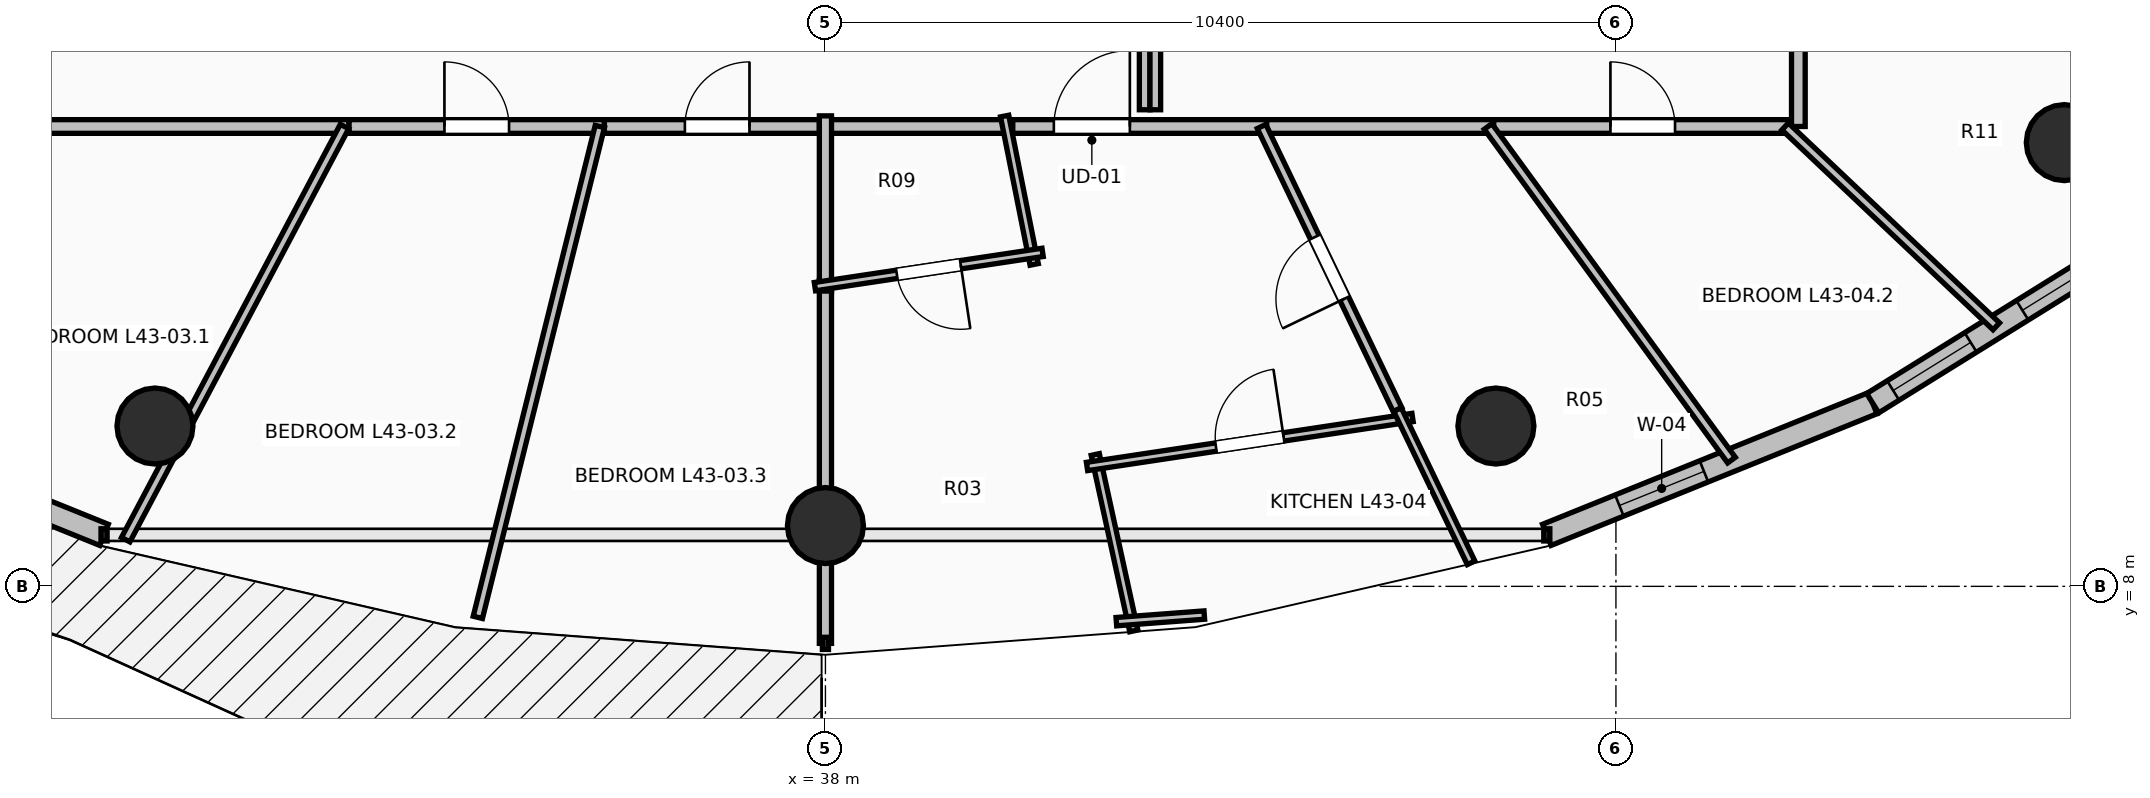
"""IFC4 building model, lengths in metres.
Left out: names, types, materials, properties, quantities, classifications, styles, units other than length and angle.
Written with IfcOpenShell. Run it as: python <this file> out.ifc"""

import sys

from ifc_helpers import new_model, si_unit, direction, frame, frame_2d, origin, origin_2d, place, context, subcontext, project, spatial, rectangle, circle, extrude, element, fill, save


model = new_model("IFC4")
c1 = context("Model", 3, precision=1e-05, world=origin(), true_north=direction((0.0, 1.0)))
c2 = subcontext(c1, "Body", "Model", "MODEL_VIEW")
j1 = project(units=[si_unit("LENGTHUNIT", "METRE"), si_unit("PLANEANGLEUNIT", "RADIAN")], contexts=[c1])
p1 = place(None, origin())
s1 = spatial("IfcSite", under=j1, at=p1, CompositionType="ELEMENT")
p2 = place(p1, origin())
s2 = spatial("IfcBuilding", under=s1, at=p2, CompositionType="ELEMENT")
p3 = place(p2, frame((0.0, 0.0, 160.6)))
s3 = spatial("IfcBuildingStorey", under=s2, at=p3, CompositionType="ELEMENT", Elevation=160.6)
for number, where, z_axis, x_axis in (
    (1, (29.179, 10.109, 0.0), (0.0, 0.0, 1.0), (-0.383, -0.924, 0.0)),
    (2, (38.0, 8.8, 0.0), (0.0, 0.0, 1.0), (0.0, -1.0, 0.0)),
    (3, (46.821, 10.109, 0.0), (0.0, 0.0, 1.0), (0.383, -0.924, 0.0)),
    (4, (54.299, 13.838, 0.0), (0.0, 0.0, 1.0), (0.707, -0.707, 0.0)),
):
    element("IfcColumn", number, at=place(p3, frame(where, z_axis=z_axis, x_axis=x_axis)), inside=s3, PredefinedType="COLUMN", context=c2, shape_type="SweptSolid", body=[
        extrude(circle(Radius=0.5, at=origin_2d()), origin(), (0.0, 0.0, 1.0), 3.5),
    ])
p4 = place(p3, frame((24.222, 10.41, 0.0), z_axis=(0.0, 0.0, 1.0), x_axis=(0.927156504392, -0.374674280359, 0.0)))
e5 = element("IfcWall", 5, at=p4, inside=s3, PredefinedType="STANDARD", context=c2, shape_type="SweptSolid", body=[
    extrude(rectangle(XDim=4.625, YDim=0.3, at=frame_2d((2.312, 0.0))), origin(), (0.0, 0.0, 1.0), 3.24),
])
p5 = place(p4, frame((1.512, 0.0, 0.0)))
e6 = element("IfcOpeningElement", 6, at=p5, cuts=e5, PredefinedType="OPENING", context=c2, shape_type="SweptSolid", body=[
    extrude(rectangle(XDim=1.6, YDim=2.3, at=frame_2d((0.8, 1.15))), frame((0.0, 0.165, 0.0), z_axis=(0.0, -1.0, 0.0), x_axis=(1.0, 0.0, 0.0)), (0.0, 0.0, 1.0), 0.33),
])
p6 = place(p3, frame((47.49, 8.677, 0.0), z_axis=(0.0, 0.0, 1.0), x_axis=(0.927156504392, 0.374674280359, 0.0)))
e7 = element("IfcWall", 7, at=p6, inside=s3, PredefinedType="STANDARD", context=c2, shape_type="SweptSolid", body=[
    extrude(rectangle(XDim=4.625, YDim=0.3, at=frame_2d((2.312, 0.0))), origin(), (0.0, 0.0, 1.0), 3.24),
])
p7 = place(p6, frame((1.03, 0.0, 0.85)))
e8 = element("IfcOpeningElement", 8, at=p7, cuts=e7, PredefinedType="OPENING", context=c2, shape_type="SweptSolid", body=[
    extrude(rectangle(XDim=1.2, YDim=1.95, at=frame_2d((0.6, 0.975))), frame((0.0, 0.165, 0.0), z_axis=(0.0, -1.0, 0.0), x_axis=(1.0, 0.0, 0.0)), (0.0, 0.0, 1.0), 0.33),
])
p8 = place(p3, frame((51.778, 10.41, 0.0), z_axis=(0.0, 0.0, 1.0), x_axis=(0.849721181976, 0.527232313977, 0.0)))
e9 = element("IfcWall", 9, at=p8, inside=s3, PredefinedType="STANDARD", context=c2, shape_type="SweptSolid", body=[
    extrude(rectangle(XDim=4.423, YDim=0.3, at=frame_2d((2.211, 0.0))), origin(), (0.0, 0.0, 1.0), 3.24),
])
p9 = place(p8, frame((0.317, 0.0, 0.85)))
e10 = element("IfcOpeningElement", 10, at=p9, cuts=e9, PredefinedType="OPENING", context=c2, shape_type="SweptSolid", body=[
    extrude(rectangle(XDim=1.2, YDim=1.95, at=frame_2d((0.6, 0.975))), frame((0.0, 0.165, 0.0), z_axis=(0.0, -1.0, 0.0), x_axis=(1.0, 0.0, 0.0)), (0.0, 0.0, 1.0), 0.33),
])
p10 = place(p8, frame((2.318, 0.0, 0.85)))
e11 = element("IfcOpeningElement", 11, at=p10, cuts=e9, PredefinedType="OPENING", context=c2, shape_type="SweptSolid", body=[
    extrude(rectangle(XDim=1.2, YDim=1.95, at=frame_2d((0.6, 0.975))), frame((0.0, 0.165, 0.0), z_axis=(0.0, -1.0, 0.0), x_axis=(1.0, 0.0, 0.0)), (0.0, 0.0, 1.0), 0.33),
])
p11 = place(p3, frame((27.357, 14.05, 0.0), z_axis=(0.0, 0.0, 1.0), x_axis=(1.0, 0.0, 0.0)))
e12 = element("IfcWall", 12, at=p11, inside=s3, PredefinedType="PARTITIONING", context=c2, shape_type="SweptSolid", body=[
    extrude(rectangle(XDim=4.376, YDim=0.18, at=frame_2d((2.188, 0.0))), origin(), (0.0, 0.0, 1.0), 2.432),
])
p12 = place(p3, frame((31.733, 14.05, 0.0), z_axis=(0.0, 0.0, 1.0), x_axis=(1.0, 0.0, 0.0)))
e13 = element("IfcWall", 13, at=p12, inside=s3, PredefinedType="PARTITIONING", context=c2, shape_type="SweptSolid", body=[
    extrude(rectangle(XDim=3.359, YDim=0.18, at=frame_2d((1.68, 0.0))), origin(), (0.0, 0.0, 1.0), 2.929),
])
p13 = place(p12, frame((1.254, 0.0, 0.0)))
e14 = element("IfcOpeningElement", 14, at=p13, cuts=e13, PredefinedType="OPENING", context=c2, shape_type="SweptSolid", body=[
    extrude(rectangle(XDim=0.85, YDim=2.1, at=frame_2d((0.425, 1.05))), frame((0.0, 0.105, 0.0), z_axis=(0.0, -1.0, 0.0), x_axis=(1.0, 0.0, 0.0)), (0.0, 0.0, 1.0), 0.21),
])
p14 = place(p3, frame((35.092, 14.05, 0.0), z_axis=(0.0, 0.0, 1.0), x_axis=(1.0, 0.0, 0.0)))
e15 = element("IfcWall", 15, at=p14, inside=s3, PredefinedType="PARTITIONING", context=c2, shape_type="SweptSolid", body=[
    extrude(rectangle(XDim=2.968, YDim=0.18, at=frame_2d((1.484, 0.0))), origin(), (0.0, 0.0, 1.0), 2.929),
])
p15 = place(p14, frame((1.059, 0.0, 0.0)))
e16 = element("IfcOpeningElement", 16, at=p15, cuts=e15, PredefinedType="OPENING", context=c2, shape_type="SweptSolid", body=[
    extrude(rectangle(XDim=0.85, YDim=2.1, at=frame_2d((0.425, 1.05))), frame((0.0, 0.105, 0.0), z_axis=(0.0, -1.0, 0.0), x_axis=(1.0, 0.0, 0.0)), (0.0, 0.0, 1.0), 0.21),
])
p16 = place(p3, frame((40.325, 14.05, 0.0), z_axis=(0.0, 0.0, 1.0), x_axis=(1.0, 0.0, 0.0)))
e17 = element("IfcWall", 17, at=p16, inside=s3, PredefinedType="PARTITIONING", context=c2, shape_type="SweptSolid", body=[
    extrude(rectangle(XDim=3.48, YDim=0.18, at=frame_2d((1.74, 0.0))), origin(), (0.0, 0.0, 1.0), 3.24),
])
p17 = place(p16, frame((0.68, 0.0, 0.0)))
e18 = element("IfcOpeningElement", 18, at=p17, cuts=e17, PredefinedType="OPENING", context=c2, shape_type="SweptSolid", body=[
    extrude(rectangle(XDim=1.0, YDim=2.15, at=frame_2d((0.5, 1.075))), frame((0.0, 0.105, 0.0), z_axis=(0.0, -1.0, 0.0), x_axis=(1.0, 0.0, 0.0)), (0.0, 0.0, 1.0), 0.21),
])
p18 = place(p3, frame((37.92, 14.05, 0.0), z_axis=(0.0, 0.0, 1.0), x_axis=(1.0, 0.0, 0.0)))
e19 = element("IfcWall", 19, at=p18, inside=s3, PredefinedType="PARTITIONING", context=c2, shape_type="SweptSolid", body=[
    extrude(rectangle(XDim=2.545, YDim=0.18, at=frame_2d((1.272, 0.0))), origin(), (0.0, 0.0, 1.0), 2.929),
])
p19 = place(p3, frame((43.805, 14.05, 0.0), z_axis=(0.0, 0.0, 1.0), x_axis=(1.0, 0.0, 0.0)))
e20 = element("IfcWall", 20, at=p19, inside=s3, PredefinedType="PARTITIONING", context=c2, shape_type="SweptSolid", body=[
    extrude(rectangle(XDim=2.987, YDim=0.18, at=frame_2d((1.494, 0.0))), origin(), (0.0, 0.0, 1.0), 2.432),
])
p20 = place(p3, frame((46.792, 14.05, 0.0), z_axis=(0.0, 0.0, 1.0), x_axis=(1.0, 0.0, 0.0)))
e21 = element("IfcWall", 21, at=p20, inside=s3, PredefinedType="PARTITIONING", context=c2, shape_type="SweptSolid", body=[
    extrude(rectangle(XDim=3.921, YDim=0.18, at=frame_2d((1.96, 0.0))), origin(), (0.0, 0.0, 1.0), 2.432),
])
p21 = place(p20, frame((1.535, 0.0, 0.0)))
e22 = element("IfcOpeningElement", 22, at=p21, cuts=e21, PredefinedType="OPENING", context=c2, shape_type="SweptSolid", body=[
    extrude(rectangle(XDim=0.85, YDim=2.1, at=frame_2d((0.425, 1.05))), frame((0.0, 0.105, 0.0), z_axis=(0.0, -1.0, 0.0), x_axis=(1.0, 0.0, 0.0)), (0.0, 0.0, 1.0), 0.21),
])
p22 = place(p3, frame((50.8, 14.05, 0.0), z_axis=(0.0, 0.0, 1.0), x_axis=(0.0, 1.0, 0.0)))
e23 = element("IfcWall", 23, at=p22, inside=s3, PredefinedType="PARTITIONING", context=c2, shape_type="SweptSolid", body=[
    extrude(rectangle(XDim=3.709, YDim=0.18, at=frame_2d((1.854, 0.0))), origin(), (0.0, 0.0, 1.0), 2.432),
])
p23 = place(p22, frame((1.429, 0.0, 0.0)))
e24 = element("IfcOpeningElement", 24, at=p23, cuts=e23, PredefinedType="OPENING", context=c2, shape_type="SweptSolid", body=[
    extrude(rectangle(XDim=0.85, YDim=2.1, at=frame_2d((0.425, 1.05))), frame((0.0, 0.105, 0.0), z_axis=(0.0, -1.0, 0.0), x_axis=(1.0, 0.0, 0.0)), (0.0, 0.0, 1.0), 0.21),
])
p24 = place(p3, frame((28.794, 8.614, 0.0), z_axis=(0.0, 0.0, 1.0), x_axis=(0.468046359573, 0.883703912682, 0.0)))
e25 = element("IfcWall", 25, at=p24, inside=s3, PredefinedType="PARTITIONING", context=c2, shape_type="SweptSolid", body=[
    extrude(rectangle(XDim=6.151, YDim=0.125, at=frame_2d((3.076, 0.0))), origin(), (0.0, 0.0, 1.0), 2.728),
])
p25 = place(p3, frame((33.427, 7.592, 0.0), z_axis=(0.0, 0.0, 1.0), x_axis=(0.241188715884, 0.970478234341, 0.0)))
e26 = element("IfcWall", 26, at=p25, inside=s3, PredefinedType="PARTITIONING", context=c2, shape_type="SweptSolid", body=[
    extrude(rectangle(XDim=6.655, YDim=0.125, at=frame_2d((3.327, 0.0))), origin(), (0.0, 0.0, 1.0), 2.728),
])
p26 = place(p3, frame((38.0, 7.25, 0.0), z_axis=(0.0, 0.0, 1.0), x_axis=(0.0, 1.0, 0.0)))
e27 = element("IfcWall", 27, at=p26, inside=s3, PredefinedType="PARTITIONING", context=c2, shape_type="SweptSolid", body=[
    extrude(rectangle(XDim=4.775, YDim=0.16, at=frame_2d((2.387, 0.0))), origin(), (0.0, 0.0, 1.0), 2.886),
])
p27 = place(p3, frame((38.0, 11.885, 0.0), z_axis=(0.0, 0.0, 1.0), x_axis=(0.0, 1.0, 0.0)))
e28 = element("IfcWall", 28, at=p27, inside=s3, PredefinedType="PARTITIONING", context=c2, shape_type="SweptSolid", body=[
    extrude(rectangle(XDim=2.305, YDim=0.16, at=frame_2d((1.152, 0.0))), origin(), (0.0, 0.0, 1.0), 2.929),
])
p28 = place(p3, frame((40.358, 14.187, 0.0), z_axis=(0.0, 0.0, 1.0), x_axis=(0.195313900905, -0.980740781304, 0.0)))
e29 = element("IfcWall", 29, at=p28, inside=s3, PredefinedType="PARTITIONING", context=c2, shape_type="SweptSolid", body=[
    extrude(rectangle(XDim=1.99, YDim=0.11, at=frame_2d((0.995, 0.0))), origin(), (0.0, 0.0, 1.0), 2.929),
])
p29 = place(p3, frame((40.857, 12.394, 0.0), z_axis=(0.0, 0.0, 1.0), x_axis=(-0.988873015636, -0.148762088409, 0.0)))
e30 = element("IfcWall", 30, at=p29, inside=s3, PredefinedType="PARTITIONING", context=c2, shape_type="SweptSolid", body=[
    extrude(rectangle(XDim=3.03, YDim=0.11, at=frame_2d((1.515, 0.0))), origin(), (0.0, 0.0, 1.0), 3.24),
])
p30 = place(p29, frame((1.09, 0.0, 0.0)))
e31 = element("IfcOpeningElement", 31, at=p30, cuts=e30, PredefinedType="OPENING", context=c2, shape_type="SweptSolid", body=[
    extrude(rectangle(XDim=0.85, YDim=2.1, at=frame_2d((0.425, 1.05))), frame((0.0, 0.07, 0.0), z_axis=(0.0, -1.0, 0.0), x_axis=(1.0, 0.0, 0.0)), (0.0, 0.0, 1.0), 0.14),
])
p31 = place(p3, frame((42.057, 7.414, 0.0), z_axis=(0.0, 0.0, 1.0), x_axis=(-0.213381137421, 0.976969032361, 0.0)))
e32 = element("IfcWall", 32, at=p31, inside=s3, PredefinedType="PARTITIONING", context=c2, shape_type="SweptSolid", body=[
    extrude(rectangle(XDim=2.375, YDim=0.11, at=frame_2d((1.188, 0.0))), origin(), (0.0, 0.0, 1.0), 2.728),
])
p32 = place(p3, frame((41.442, 9.577, 0.0), z_axis=(0.0, 0.0, 1.0), x_axis=(0.988864290865, 0.148820073417, 0.0)))
e33 = element("IfcWall", 33, at=p32, inside=s3, PredefinedType="PARTITIONING", context=c2, shape_type="SweptSolid", body=[
    extrude(rectangle(XDim=4.331, YDim=0.11, at=frame_2d((2.166, 0.0))), origin(), (0.0, 0.0, 1.0), 3.24),
])
p33 = place(p32, frame((1.716, 0.0, 0.0)))
e34 = element("IfcOpeningElement", 34, at=p33, cuts=e33, PredefinedType="OPENING", context=c2, shape_type="SweptSolid", body=[
    extrude(rectangle(XDim=0.9, YDim=2.1, at=frame_2d((0.45, 1.05))), frame((0.0, 0.07, 0.0), z_axis=(0.0, -1.0, 0.0), x_axis=(1.0, 0.0, 0.0)), (0.0, 0.0, 1.0), 0.14),
])
p34 = place(p3, frame((45.525, 10.327, 0.0), z_axis=(0.0, 0.0, 1.0), x_axis=(0.433064390328, -0.901362986721, 0.0)))
e35 = element("IfcWall", 35, at=p34, inside=s3, PredefinedType="PARTITIONING", context=c2, shape_type="SweptSolid", body=[
    extrude(rectangle(XDim=2.238, YDim=0.11, at=frame_2d((1.119, 0.0))), origin(), (0.0, 0.0, 1.0), 2.728),
])
p35 = place(p3, frame((41.827, 7.535, 0.0), z_axis=(0.0, 0.0, 1.0), x_axis=(0.997175725754, 0.07510374137, 0.0)))
e36 = element("IfcWall", 36, at=p35, inside=s3, PredefinedType="PARTITIONING", context=c2, shape_type="SweptSolid", body=[
    extrude(rectangle(XDim=1.16, YDim=0.11, at=frame_2d((0.58, 0.0))), origin(), (0.0, 0.0, 1.0), 3.24),
])
p36 = place(p3, frame((45.526, 10.327, 0.0), z_axis=(0.0, 0.0, 1.0), x_axis=(-0.432873287366, 0.90145477817, 0.0)))
e37 = element("IfcWall", 37, at=p36, inside=s3, PredefinedType="PARTITIONING", context=c2, shape_type="SweptSolid", body=[
    extrude(rectangle(XDim=4.13, YDim=0.125, at=frame_2d((2.065, 0.0))), origin(), (0.0, 0.0, 1.0), 2.432),
])
p37 = place(p36, frame((1.615, 0.0, 0.0)))
e38 = element("IfcOpeningElement", 38, at=p37, cuts=e37, PredefinedType="OPENING", context=c2, shape_type="SweptSolid", body=[
    extrude(rectangle(XDim=0.9, YDim=2.1, at=frame_2d((0.45, 1.05))), frame((0.0, 0.077, 0.0), z_axis=(0.0, -1.0, 0.0), x_axis=(1.0, 0.0, 0.0)), (0.0, 0.0, 1.0), 0.155),
])
p38 = place(p3, frame((49.92, 9.661, 0.0), z_axis=(0.0, 0.0, 1.0), x_axis=(-0.589349395673, 0.807878264233, 0.0)))
e39 = element("IfcWall", 39, at=p38, inside=s3, PredefinedType="PARTITIONING", context=c2, shape_type="SweptSolid", body=[
    extrude(rectangle(XDim=5.433, YDim=0.125, at=frame_2d((2.716, 0.0))), origin(), (0.0, 0.0, 1.0), 2.432),
])
p39 = place(p3, frame((53.404, 11.421, 0.0), z_axis=(0.0, 0.0, 1.0), x_axis=(-0.726306487509, 0.687370996044, 0.0)))
e40 = element("IfcWall", 40, at=p39, inside=s3, PredefinedType="PARTITIONING", context=c2, shape_type="SweptSolid", body=[
    extrude(rectangle(XDim=3.825, YDim=0.125, at=frame_2d((1.913, 0.0))), origin(), (0.0, 0.0, 1.0), 2.728),
])
p40 = place(p3, frame((56.736, 13.85, 0.0), z_axis=(0.0, 0.0, 1.0), x_axis=(-0.839059638195, 0.544039450364, 0.0)))
e41 = element("IfcWall", 41, at=p40, inside=s3, PredefinedType="PARTITIONING", context=c2, shape_type="SweptSolid", body=[
    extrude(rectangle(XDim=7.075, YDim=0.125, at=frame_2d((3.537, 0.0))), origin(), (0.0, 0.0, 1.0), 2.728),
])
for number, where, z_axis, x_axis in (
    (42, (42.2, 16.1, 0.0), (0.0, 0.0, 1.0), (0.0, -1.0, 0.0)),
    (43, (42.34, 14.27, 0.0), (0.0, 0.0, 1.0), (0.0, 1.0, 0.0)),
):
    element("IfcWall", number, at=place(p3, frame(where, z_axis=z_axis, x_axis=x_axis)), inside=s3, PredefinedType="PARTITIONING", context=c2, shape_type="SweptSolid", body=[
        extrude(rectangle(XDim=1.83, YDim=0.14, at=frame_2d((0.915, 0.0))), origin(), (0.0, 0.0, 1.0), 3.24),
    ])
p41 = place(p7, origin())
e44 = element("IfcWindow", 44, at=p41, inside=s3, PartitioningType="SINGLE_PANEL", PredefinedType="WINDOW", context=c2, shape_type="SweptSolid", body=[
    extrude(rectangle(XDim=1.2, YDim=1.95, at=frame_2d((0.6, 0.975))), frame((0.0, 0.03, 0.0), z_axis=(0.0, -1.0, 0.0), x_axis=(1.0, 0.0, 0.0)), (0.0, 0.0, 1.0), 0.06),
])
fill(e8, e44)
p42 = place(p9, origin())
e45 = element("IfcWindow", 45, at=p42, inside=s3, PartitioningType="SINGLE_PANEL", PredefinedType="WINDOW", context=c2, shape_type="SweptSolid", body=[
    extrude(rectangle(XDim=1.2, YDim=1.95, at=frame_2d((0.6, 0.975))), frame((0.0, 0.03, 0.0), z_axis=(0.0, -1.0, 0.0), x_axis=(1.0, 0.0, 0.0)), (0.0, 0.0, 1.0), 0.06),
])
fill(e10, e45)
p43 = place(p10, origin())
e46 = element("IfcWindow", 46, at=p43, inside=s3, PartitioningType="SINGLE_PANEL", PredefinedType="WINDOW", context=c2, shape_type="SweptSolid", body=[
    extrude(rectangle(XDim=1.2, YDim=1.95, at=frame_2d((0.6, 0.975))), frame((0.0, 0.03, 0.0), z_axis=(0.0, -1.0, 0.0), x_axis=(1.0, 0.0, 0.0)), (0.0, 0.0, 1.0), 0.06),
])
fill(e11, e46)
p44 = place(p17, origin())
e47 = element("IfcDoor", 47, at=p44, inside=s3, OperationType="SINGLE_SWING_RIGHT", PredefinedType="DOOR", context=c2, shape_type="SweptSolid", body=[
    extrude(rectangle(XDim=1.0, YDim=2.15, at=frame_2d((0.5, 1.075))), frame((0.0, 0.025, 0.0), z_axis=(0.0, -1.0, 0.0), x_axis=(1.0, 0.0, 0.0)), (0.0, 0.0, 1.0), 0.05),
])
fill(e18, e47)
p45 = place(p30, origin())
e48 = element("IfcDoor", 48, at=p45, inside=s3, OperationType="SINGLE_SWING_LEFT", PredefinedType="DOOR", context=c2, shape_type="SweptSolid", body=[
    extrude(rectangle(XDim=0.85, YDim=2.1, at=frame_2d((0.425, 1.05))), frame((0.0, 0.025, 0.0), z_axis=(0.0, -1.0, 0.0), x_axis=(1.0, 0.0, 0.0)), (0.0, 0.0, 1.0), 0.05),
])
fill(e31, e48)
p46 = place(p33, origin())
e49 = element("IfcDoor", 49, at=p46, inside=s3, OperationType="SINGLE_SWING_RIGHT", PredefinedType="DOOR", context=c2, shape_type="SweptSolid", body=[
    extrude(rectangle(XDim=0.9, YDim=2.1, at=frame_2d((0.45, 1.05))), frame((0.0, 0.025, 0.0), z_axis=(0.0, -1.0, 0.0), x_axis=(1.0, 0.0, 0.0)), (0.0, 0.0, 1.0), 0.05),
])
fill(e34, e49)
p47 = place(p37, origin())
e50 = element("IfcDoor", 50, at=p47, inside=s3, OperationType="SINGLE_SWING_LEFT", PredefinedType="DOOR", context=c2, shape_type="SweptSolid", body=[
    extrude(rectangle(XDim=0.9, YDim=2.1, at=frame_2d((0.45, 1.05))), frame((0.0, 0.025, 0.0), z_axis=(0.0, -1.0, 0.0), x_axis=(1.0, 0.0, 0.0)), (0.0, 0.0, 1.0), 0.05),
])
fill(e38, e50)
p48 = place(p13, origin())
e51 = element("IfcDoor", 51, at=p48, inside=s3, OperationType="SINGLE_SWING_LEFT", PredefinedType="DOOR", context=c2, shape_type="SweptSolid", body=[
    extrude(rectangle(XDim=0.85, YDim=2.1, at=frame_2d((0.425, 1.05))), frame((0.0, 0.025, 0.0), z_axis=(0.0, -1.0, 0.0), x_axis=(1.0, 0.0, 0.0)), (0.0, 0.0, 1.0), 0.05),
])
fill(e14, e51)
p49 = place(p15, origin())
e52 = element("IfcDoor", 52, at=p49, inside=s3, OperationType="SINGLE_SWING_RIGHT", PredefinedType="DOOR", context=c2, shape_type="SweptSolid", body=[
    extrude(rectangle(XDim=0.85, YDim=2.1, at=frame_2d((0.425, 1.05))), frame((0.0, 0.025, 0.0), z_axis=(0.0, -1.0, 0.0), x_axis=(1.0, 0.0, 0.0)), (0.0, 0.0, 1.0), 0.05),
])
fill(e16, e52)
p50 = place(p21, origin())
e53 = element("IfcDoor", 53, at=p50, inside=s3, OperationType="SINGLE_SWING_LEFT", PredefinedType="DOOR", context=c2, shape_type="SweptSolid", body=[
    extrude(rectangle(XDim=0.85, YDim=2.1, at=frame_2d((0.425, 1.05))), frame((0.0, 0.025, 0.0), z_axis=(0.0, -1.0, 0.0), x_axis=(1.0, 0.0, 0.0)), (0.0, 0.0, 1.0), 0.05),
])
fill(e22, e53)
save(model, sys.argv[1])
